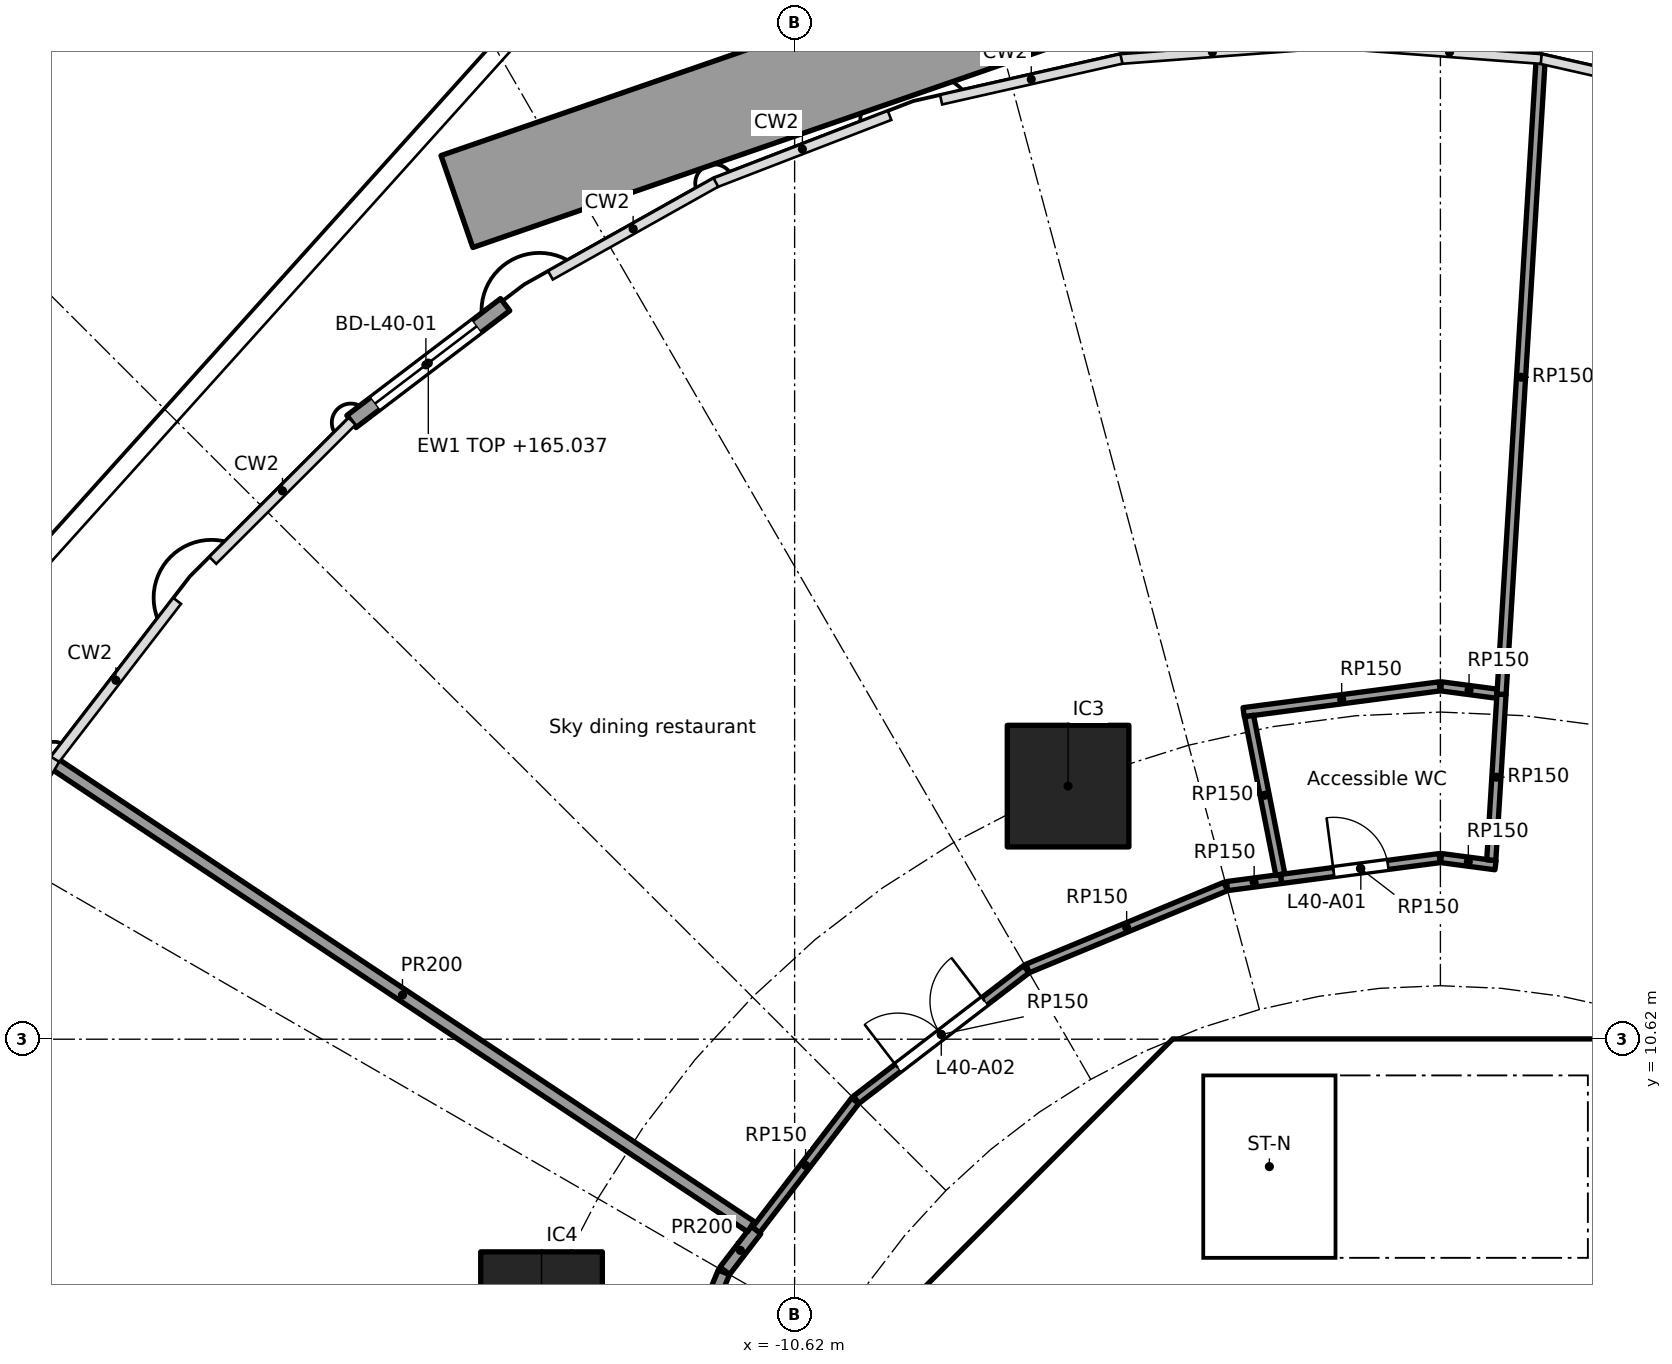
"""IFC4 building model, lengths in metres.
Left out: names, types, materials, properties, quantities, classifications, styles, units other than length and angle.
Written with IfcOpenShell. Run it as: python <this file> out.ifc"""

import sys

from ifc_helpers import new_model, si_unit, direction, frame, frame_2d, origin, origin_2d, place, context, subcontext, project, spatial, polyline, rectangle, outline, extrude, element, fill, save


model = new_model("IFC4")
c1 = context("Model", 3, precision=1e-05, world=origin(), true_north=direction((0.0, 1.0)))
c2 = subcontext(c1, "Body", "Model", "MODEL_VIEW")
j1 = project(units=[si_unit("LENGTHUNIT", "METRE"), si_unit("PLANEANGLEUNIT", "RADIAN")], contexts=[c1])
p1 = place(None, origin())
s1 = spatial("IfcSite", under=j1, at=p1, CompositionType="ELEMENT")
p2 = place(p1, origin())
s2 = spatial("IfcBuilding", under=s1, at=p2, CompositionType="ELEMENT")
p3 = place(p2, frame((0.0, 0.0, 160.3)))
s3 = spatial("IfcBuildingStorey", under=s2, at=p3, CompositionType="ELEMENT", Elevation=160.3)
for number, where, z_axis, x_axis in (
    (1, (-6.123, 14.782, 0.0), (0.0, 0.0, 1.0), (1.0, 0.0, 0.0)),
    (2, (-14.782, 6.123, 0.0), (0.0, 0.0, 1.0), (1.0, 0.0, 0.0)),
):
    element("IfcColumn", number, at=place(p3, frame(where, z_axis=z_axis, x_axis=x_axis)), inside=s3, PredefinedType="COLUMN", context=c2, shape_type="SweptSolid", body=[
        extrude(rectangle(XDim=2.0, YDim=2.0, at=origin_2d()), origin(), (0.0, 0.0, 1.0), 5.6),
    ])
p4 = place(p3, frame((-17.908, 20.778, 0.0), z_axis=(0.0, 0.0, 1.0), x_axis=(0.796015506154, 0.605276229471, 0.0)))
e3 = element("IfcWall", 3, at=p4, inside=s3, PredefinedType="SOLIDWALL", context=c2, shape_type="SweptSolid", body=[
    extrude(rectangle(XDim=3.176, YDim=0.25, at=frame_2d((1.588, 0.0))), origin(), (0.0, 0.0, 1.0), 4.737),
])
p5 = place(p4, frame((0.488, 0.0, 0.0)))
e4 = element("IfcOpeningElement", 4, at=p5, cuts=e3, PredefinedType="OPENING", context=c2, shape_type="SweptSolid", body=[
    extrude(rectangle(XDim=2.1, YDim=2.4, at=frame_2d((1.05, 1.2))), frame((0.0, 0.135, 0.0), z_axis=(0.0, -1.0, 0.0), x_axis=(1.0, 0.0, 0.0)), (0.0, 0.0, 1.0), 0.27),
])
p6 = place(p3, frame((-1.15, 29.591, 0.0), z_axis=(0.0, 0.0, 1.0), x_axis=(-0.945083898626, -0.326827820967, 0.0)))
e5 = element("IfcWall", 5, at=p6, inside=s3, PredefinedType="SOLIDWALL", context=c2, shape_type="SweptSolid", body=[
    extrude(rectangle(XDim=15.897, YDim=1.6, at=frame_2d((7.948, 0.0))), origin(), (0.0, 0.0, 1.0), 1.1),
])
p7 = place(p3, frame((-4.613, 9.988, 0.0), z_axis=(0.0, 0.0, 1.0), x_axis=(-0.707106781187, -0.707106781187, 0.0)))
e6 = element("IfcWall", 6, at=p7, inside=s3, PredefinedType="SHEAR", context=c2, shape_type="SweptSolid", body=[
    extrude(rectangle(XDim=7.602, YDim=0.6, at=frame_2d((3.801, 0.0))), origin(), (0.0, 0.0, 1.0), 5.34),
])
p8 = place(p7, frame((0.351, 0.0, 0.0)))
e7 = element("IfcOpeningElement", 7, at=p8, cuts=e6, PredefinedType="OPENING", context=c2, shape_type="SweptSolid", body=[
    extrude(rectangle(XDim=1.1, YDim=2.1, at=frame_2d((0.55, 1.05))), frame((0.0, 0.31, 0.0), z_axis=(0.0, -1.0, 0.0), x_axis=(1.0, 0.0, 0.0)), (0.0, 0.0, 1.0), 0.62),
])
p9 = place(p3, frame((-5.8, 4.3, 0.0), z_axis=(0.0, 0.0, 1.0), x_axis=(0.0, 1.0, 0.0)))
e8 = element("IfcWall", 8, at=p9, inside=s3, PredefinedType="PARTITIONING", context=c2, shape_type="SweptSolid", body=[
    extrude(rectangle(XDim=3.927, YDim=0.15, at=frame_2d((1.963, 0.0))), origin(), (0.0, 0.0, 1.0), 5.34),
])
p10 = place(p9, frame((1.551, 0.0, 0.0)))
e9 = element("IfcOpeningElement", 9, at=p10, cuts=e8, PredefinedType="OPENING", context=c2, shape_type="SweptSolid", body=[
    extrude(rectangle(XDim=0.9, YDim=2.1, at=frame_2d((0.45, 1.05))), frame((0.0, 0.085, 0.0), z_axis=(0.0, -1.0, 0.0), x_axis=(1.0, 0.0, 0.0)), (0.0, 0.0, 1.0), 0.17),
])
p11 = place(p3, origin())
e10 = element("IfcWall", 10, at=p11, inside=s3, PredefinedType="SHEAR", context=c2, shape_type="SweptSolid", body=[
    extrude(outline(polyline([(-4.152, 10.025), (-4.401, 9.776), (-4.825, 10.2), (-4.401, 10.625), (4.401, 10.625), (4.825, 10.2), (4.401, 9.776), (4.152, 10.025), (-4.152, 10.025)])), origin(), (0.0, 0.0, 1.0), 5.34),
])
p12 = place(p3, origin())
e11 = element("IfcWall", 11, at=p12, inside=s3, PredefinedType="SOLIDWALL", context=c2, shape_type="SweptSolid", body=[
    extrude(outline(polyline([(-3.9, 7.025), (-4.1, 7.025), (-4.1, 10.025), (-3.9, 10.025), (-3.9, 7.025)])), origin(), (0.0, 0.0, 1.0), 5.34),
])
p13 = place(p3, origin())
e12 = element("IfcWall", 12, at=p13, inside=s3, PredefinedType="SOLIDWALL", context=c2, shape_type="SweptSolid", body=[
    extrude(outline(polyline([(4.1, 6.5), (-4.1, 6.5), (-4.1, 7.025), (4.1, 7.025), (4.1, 6.5)])), origin(), (0.0, 0.0, 1.0), 5.34),
])
p14 = place(p3, frame((-11.255, 7.481, 0.0), z_axis=(0.0, 0.0, 1.0), x_axis=(0.608710767698, 0.793392211512, 0.0)))
e13 = element("IfcWall", 13, at=p14, inside=s3, PredefinedType="PARTITIONING", context=c2, shape_type="SweptSolid", body=[
    extrude(rectangle(XDim=2.68, YDim=0.15, at=frame_2d((1.34, 0.0))), origin(), (0.0, 0.0, 1.0), 5.34),
])
p15 = place(p3, frame((-9.607, 9.624, 0.0), z_axis=(0.0, 0.0, 1.0), x_axis=(0.793372307201, 0.608736710054, 0.0)))
e14 = element("IfcWall", 14, at=p15, inside=s3, PredefinedType="PARTITIONING", context=c2, shape_type="SweptSolid", body=[
    extrude(rectangle(XDim=3.527, YDim=0.15, at=frame_2d((1.763, 0.0))), origin(), (0.0, 0.0, 1.0), 5.34),
])
p16 = place(p15, frame((0.863, 0.0, 0.0)))
e15 = element("IfcOpeningElement", 15, at=p16, cuts=e14, PredefinedType="OPENING", context=c2, shape_type="SweptSolid", body=[
    extrude(rectangle(XDim=1.8, YDim=2.1, at=frame_2d((0.9, 1.05))), frame((0.0, 0.085, 0.0), z_axis=(0.0, -1.0, 0.0), x_axis=(1.0, 0.0, 0.0)), (0.0, 0.0, 1.0), 0.17),
])
p17 = place(p3, frame((-6.789, 11.782, 0.0), z_axis=(0.0, 0.0, 1.0), x_axis=(0.923881838111, 0.382677866108, 0.0)))
e16 = element("IfcWall", 16, at=p17, inside=s3, PredefinedType="PARTITIONING", context=c2, shape_type="SweptSolid", body=[
    extrude(rectangle(XDim=3.527, YDim=0.15, at=frame_2d((1.763, 0.0))), origin(), (0.0, 0.0, 1.0), 5.34),
])
p18 = place(p3, frame((-3.508, 13.138, 0.0), z_axis=(0.0, 0.0, 1.0), x_axis=(0.991445037541, 0.130524854092, 0.0)))
e17 = element("IfcWall", 17, at=p18, inside=s3, PredefinedType="PARTITIONING", context=c2, shape_type="SweptSolid", body=[
    extrude(rectangle(XDim=0.898, YDim=0.15, at=frame_2d((0.449, 0.0))), origin(), (0.0, 0.0, 1.0), 5.34),
])
p19 = place(p3, frame((-3.236, 15.998, 0.0), z_axis=(0.0, 0.0, 1.0), x_axis=(0.991450717699, 0.130481701299, 0.0)))
e18 = element("IfcWall", 18, at=p19, inside=s3, PredefinedType="PARTITIONING", context=c2, shape_type="SweptSolid", body=[
    extrude(rectangle(XDim=3.252, YDim=0.15, at=frame_2d((1.626, 0.0))), origin(), (0.0, 0.0, 1.0), 5.34),
])
p20 = place(p3, frame((-2.632, 13.329, 0.0), z_axis=(0.0, 0.0, 1.0), x_axis=(-0.193711042063, 0.981058628311, 0.0)))
e19 = element("IfcWall", 19, at=p20, inside=s3, PredefinedType="PARTITIONING", context=c2, shape_type="SweptSolid", body=[
    extrude(rectangle(XDim=2.656, YDim=0.15, at=frame_2d((1.328, 0.0))), origin(), (0.0, 0.0, 1.0), 5.34),
])
p21 = place(p3, frame((-2.618, 13.255, 0.0), z_axis=(0.0, 0.0, 1.0), x_axis=(0.991449553099, 0.13049055008, 0.0)))
e20 = element("IfcWall", 20, at=p21, inside=s3, PredefinedType="PARTITIONING", context=c2, shape_type="SweptSolid", body=[
    extrude(rectangle(XDim=2.629, YDim=0.15, at=frame_2d((1.314, 0.0))), origin(), (0.0, 0.0, 1.0), 5.34),
])
p22 = place(p21, frame((0.87, 0.0, 0.0)))
e21 = element("IfcOpeningElement", 21, at=p22, cuts=e20, PredefinedType="OPENING", context=c2, shape_type="SweptSolid", body=[
    extrude(rectangle(XDim=0.9, YDim=2.1, at=frame_2d((0.45, 1.05))), frame((0.0, 0.085, 0.0), z_axis=(0.0, -1.0, 0.0), x_axis=(1.0, 0.0, 0.0)), (0.0, 0.0, 1.0), 0.17),
])
p23 = place(p3, frame((0.012, 13.598, 0.0), z_axis=(0.0, 0.0, 1.0), x_axis=(0.991462580461, -0.130391531728, 0.0)))
e22 = element("IfcWall", 22, at=p23, inside=s3, PredefinedType="PARTITIONING", context=c2, shape_type="SweptSolid", body=[
    extrude(rectangle(XDim=0.903, YDim=0.15, at=frame_2d((0.451, 0.0))), origin(), (0.0, 0.0, 1.0), 5.34),
])
p24 = place(p3, frame((0.012, 16.423, 0.0), z_axis=(0.0, 0.0, 1.0), x_axis=(0.991454295543, -0.130454512571, 0.0)))
e23 = element("IfcWall", 23, at=p24, inside=s3, PredefinedType="PARTITIONING", context=c2, shape_type="SweptSolid", body=[
    extrude(rectangle(XDim=0.926, YDim=0.15, at=frame_2d((0.463, 0.0))), origin(), (0.0, 0.0, 1.0), 5.34),
])
p25 = place(p3, frame((0.837, 13.565, 0.0), z_axis=(0.0, 0.0, 1.0), x_axis=(0.061577051156, 0.998102332815, 0.0)))
e24 = element("IfcWall", 24, at=p25, inside=s3, PredefinedType="PARTITIONING", context=c2, shape_type="SweptSolid", body=[
    extrude(rectangle(XDim=2.732, YDim=0.15, at=frame_2d((1.366, 0.0))), origin(), (0.0, 0.0, 1.0), 5.34),
])
p26 = place(p3, frame((1.005, 16.292, 0.0), z_axis=(0.0, 0.0, 1.0), x_axis=(0.061550484882, 0.998103971443, 0.0)))
e25 = element("IfcWall", 25, at=p26, inside=s3, PredefinedType="PARTITIONING", context=c2, shape_type="SweptSolid", body=[
    extrude(rectangle(XDim=10.448, YDim=0.15, at=frame_2d((5.224, 0.0))), origin(), (0.0, 0.0, 1.0), 5.34),
])
p27 = place(p3, frame((-13.131, 3.534, 0.0), z_axis=(0.0, 0.0, 1.0), x_axis=(0.382723413813, 0.92386297064, 0.0)))
e26 = element("IfcWall", 26, at=p27, inside=s3, PredefinedType="PARTITIONING", context=c2, shape_type="SweptSolid", body=[
    extrude(rectangle(XDim=3.52, YDim=0.2, at=frame_2d((1.76, 0.0))), origin(), (0.0, 0.0, 1.0), 5.34),
])
p28 = place(p27, frame((2.278, 0.0, 0.0)))
e27 = element("IfcOpeningElement", 27, at=p28, cuts=e26, PredefinedType="OPENING", context=c2, shape_type="SweptSolid", body=[
    extrude(rectangle(XDim=0.9, YDim=2.1, at=frame_2d((0.45, 1.05))), frame((0.0, 0.11, 0.0), z_axis=(0.0, -1.0, 0.0), x_axis=(1.0, 0.0, 0.0)), (0.0, 0.0, 1.0), 0.22),
])
p29 = place(p3, frame((-11.769, 6.812, 0.0), z_axis=(0.0, 0.0, 1.0), x_axis=(0.60871710749, 0.793387347422, 0.0)))
e28 = element("IfcWall", 28, at=p29, inside=s3, PredefinedType="PARTITIONING", context=c2, shape_type="SweptSolid", body=[
    extrude(rectangle(XDim=0.844, YDim=0.2, at=frame_2d((0.422, 0.0))), origin(), (0.0, 0.0, 1.0), 5.34),
])
p30 = place(p3, frame((-11.339, 7.537, 0.0), z_axis=(0.0, 0.0, 1.0), x_axis=(-0.832816424089, 0.553549278536, 0.0)))
e29 = element("IfcWall", 29, at=p30, inside=s3, PredefinedType="PARTITIONING", context=c2, shape_type="SweptSolid", body=[
    extrude(rectangle(XDim=13.762, YDim=0.2, at=frame_2d((6.881, 0.0))), origin(), (0.0, 0.0, 1.0), 5.34),
])
p31 = place(p5, origin())
e30 = element("IfcDoor", 30, at=p31, inside=s3, OperationType="SLIDING_TO_LEFT", PredefinedType="DOOR", context=c2, shape_type="SweptSolid", body=[
    extrude(rectangle(XDim=2.1, YDim=2.4, at=frame_2d((1.05, 1.2))), frame((0.0, 0.025, 0.0), z_axis=(0.0, -1.0, 0.0), x_axis=(1.0, 0.0, 0.0)), (0.0, 0.0, 1.0), 0.05),
])
fill(e4, e30)
p32 = place(p10, origin())
e31 = element("IfcDoor", 31, at=p32, inside=s3, OperationType="SINGLE_SWING_LEFT", PredefinedType="DOOR", context=c2, shape_type="SweptSolid", body=[
    extrude(rectangle(XDim=0.9, YDim=2.1, at=frame_2d((0.45, 1.05))), frame((0.0, 0.025, 0.0), z_axis=(0.0, -1.0, 0.0), x_axis=(1.0, 0.0, 0.0)), (0.0, 0.0, 1.0), 0.05),
])
fill(e9, e31)
p33 = place(p8, origin())
e32 = element("IfcDoor", 32, at=p33, inside=s3, OperationType="SINGLE_SWING_LEFT", PredefinedType="DOOR", context=c2, shape_type="SweptSolid", body=[
    extrude(rectangle(XDim=1.1, YDim=2.1, at=frame_2d((0.55, 1.05))), frame((0.0, 0.025, 0.0), z_axis=(0.0, -1.0, 0.0), x_axis=(1.0, 0.0, 0.0)), (0.0, 0.0, 1.0), 0.05),
])
fill(e7, e32)
p34 = place(p22, origin())
e33 = element("IfcDoor", 33, at=p34, inside=s3, OperationType="SINGLE_SWING_LEFT", PredefinedType="DOOR", context=c2, shape_type="SweptSolid", body=[
    extrude(rectangle(XDim=0.9, YDim=2.1, at=frame_2d((0.45, 1.05))), frame((0.0, 0.025, 0.0), z_axis=(0.0, -1.0, 0.0), x_axis=(1.0, 0.0, 0.0)), (0.0, 0.0, 1.0), 0.05),
])
fill(e21, e33)
p35 = place(p16, origin())
e34 = element("IfcDoor", 34, at=p35, inside=s3, OperationType="DOUBLE_DOOR_SINGLE_SWING", PredefinedType="DOOR", context=c2, shape_type="SweptSolid", body=[
    extrude(rectangle(XDim=1.8, YDim=2.1, at=frame_2d((0.9, 1.05))), frame((0.0, 0.025, 0.0), z_axis=(0.0, -1.0, 0.0), x_axis=(1.0, 0.0, 0.0)), (0.0, 0.0, 1.0), 0.05),
])
fill(e15, e34)
save(model, sys.argv[1])
